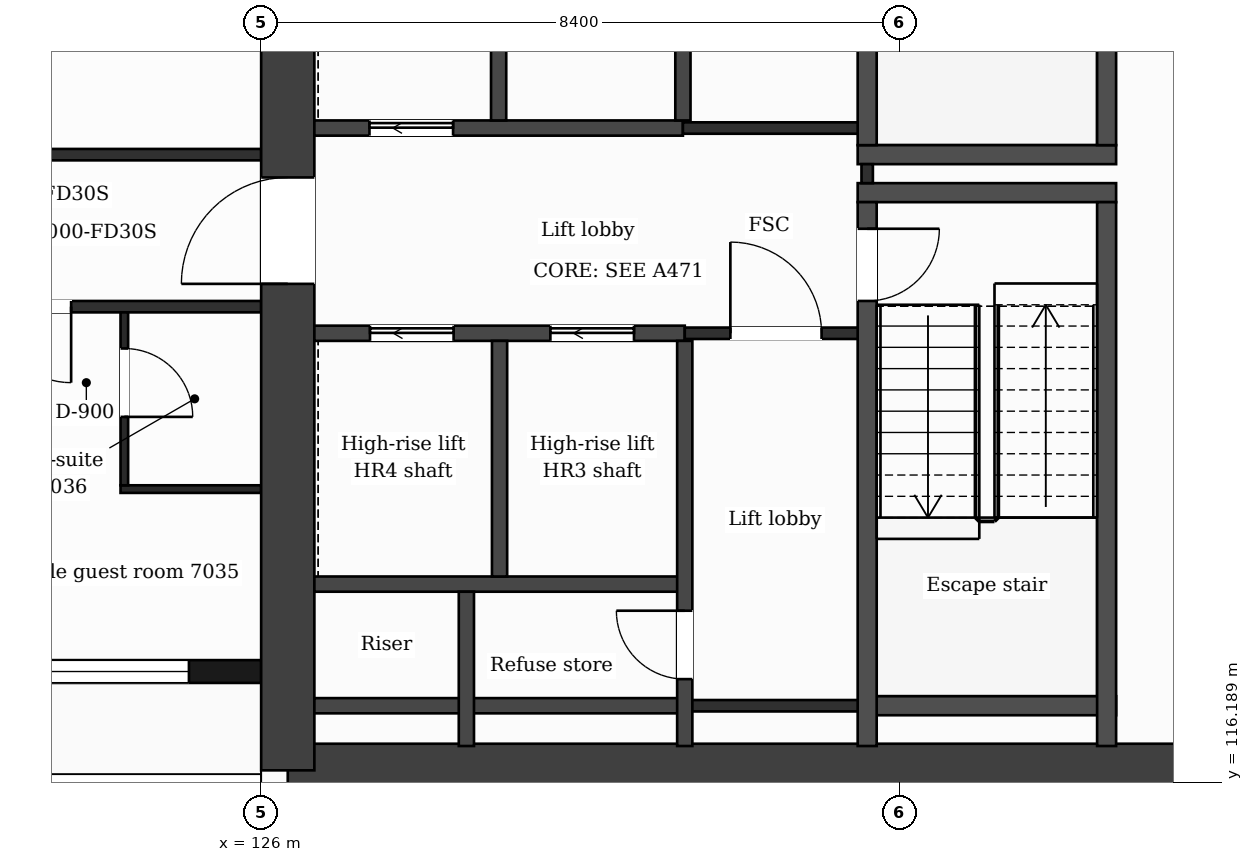
"""IFC4 building model, lengths in metres.
Left out: names, types, materials, properties, quantities, classifications, styles, units other than length and angle.
Written with IfcOpenShell. Run it as: python <this file> out.ifc"""

import sys

from ifc_helpers import new_model, si_unit, direction, frame, frame_2d, origin, place, context, subcontext, project, spatial, rectangle, extrude, element, fill, save


model = new_model("IFC4")
c1 = context("Model", 3, precision=1e-05, world=origin(), true_north=direction((0.0, 1.0)))
c2 = subcontext(c1, "Body", "Model", "MODEL_VIEW")
j1 = project(units=[si_unit("LENGTHUNIT", "METRE"), si_unit("PLANEANGLEUNIT", "RADIAN")], contexts=[c1])
p1 = place(None, origin())
s1 = spatial("IfcSite", under=j1, at=p1, CompositionType="ELEMENT")
p2 = place(p1, origin())
s2 = spatial("IfcBuilding", under=s1, at=p2, CompositionType="ELEMENT")
p3 = place(p2, frame((0.0, 0.0, 288.6)))
s3 = spatial("IfcBuildingStorey", under=s2, at=p3, CompositionType="ELEMENT", Elevation=288.6)
p4 = place(p3, frame((137.863, 132.05, 0.0), z_axis=(0.0, 0.0, 1.0), x_axis=(0.133401241494, -0.991062111458, 0.0)))
e1 = element("IfcWall", 1, at=p4, inside=s3, PredefinedType="SHEAR", context=c2, shape_type="SweptSolid", body=[
    extrude(rectangle(XDim=15.842, YDim=0.7, at=frame_2d((7.921, 0.0))), origin(), (0.0, 0.0, 1.0), 3.7),
])
p5 = place(p3, frame((139.977, 116.35, 0.0), z_axis=(0.0, 0.0, 1.0), x_axis=(-1.0, 0.0, 0.0)))
e2 = element("IfcWall", 2, at=p5, inside=s3, PredefinedType="SHEAR", context=c2, shape_type="SweptSolid", body=[
    extrude(rectangle(XDim=13.626, YDim=0.7, at=frame_2d((6.813, 0.0))), origin(), (0.0, 0.0, 1.0), 3.7),
])
p6 = place(p3, frame((126.35, 116.35, 0.0), z_axis=(0.0, 0.0, 1.0), x_axis=(0.0, 1.0, 0.0)))
e3 = element("IfcWall", 3, at=p6, inside=s3, PredefinedType="SHEAR", context=c2, shape_type="SweptSolid", body=[
    extrude(rectangle(XDim=15.7, YDim=0.7, at=frame_2d((7.85, 0.0))), origin(), (0.0, 0.0, 1.0), 3.7),
])
p7 = place(p6, frame((6.4, 0.0, 0.0)))
e4 = element("IfcOpeningElement", 4, at=p7, cuts=e3, PredefinedType="OPENING", context=c2, shape_type="SweptSolid", body=[
    extrude(rectangle(XDim=1.4, YDim=2.1, at=frame_2d((0.7, 1.05))), frame((0.0, 0.36, 0.0), z_axis=(0.0, -1.0, 0.0), x_axis=(1.0, 0.0, 0.0)), (0.0, 0.0, 1.0), 0.72),
])
p8 = place(p3, frame((100.8, 117.65, 0.0), z_axis=(0.0, 0.0, 1.0), x_axis=(1.0, 0.0, 0.0)))
e5 = element("IfcWall", 5, at=p8, inside=s3, PredefinedType="SOLIDWALL", context=c2, shape_type="SweptSolid", body=[
    extrude(rectangle(XDim=25.2, YDim=0.3, at=frame_2d((12.6, 0.0))), origin(), (0.0, 0.0, 1.0), 3.38),
])
p9 = place(p8, frame((1.55, 0.0, 0.9)))
e6 = element("IfcOpeningElement", 6, at=p9, cuts=e5, PredefinedType="OPENING", context=c2, shape_type="SweptSolid", body=[
    extrude(rectangle(XDim=1.2, YDim=2.1, at=frame_2d((0.6, 1.05))), frame((0.0, 0.16, 0.0), z_axis=(0.0, -1.0, 0.0), x_axis=(1.0, 0.0, 0.0)), (0.0, 0.0, 1.0), 0.32),
])
p10 = place(p8, frame((5.1, 0.0, 0.9)))
e7 = element("IfcOpeningElement", 7, at=p10, cuts=e5, PredefinedType="OPENING", context=c2, shape_type="SweptSolid", body=[
    extrude(rectangle(XDim=2.4, YDim=2.1, at=frame_2d((1.2, 1.05))), frame((0.0, 0.16, 0.0), z_axis=(0.0, -1.0, 0.0), x_axis=(1.0, 0.0, 0.0)), (0.0, 0.0, 1.0), 0.32),
])
p11 = place(p8, frame((9.9, 0.0, 0.0)))
e8 = element("IfcOpeningElement", 8, at=p11, cuts=e5, PredefinedType="OPENING", context=c2, shape_type="SweptSolid", body=[
    extrude(rectangle(XDim=1.2, YDim=2.4, at=frame_2d((0.6, 1.2))), frame((0.0, 0.16, 0.0), z_axis=(0.0, -1.0, 0.0), x_axis=(1.0, 0.0, 0.0)), (0.0, 0.0, 1.0), 0.32),
])
p12 = place(p8, frame((13.5, 0.0, 0.9)))
e9 = element("IfcOpeningElement", 9, at=p12, cuts=e5, PredefinedType="OPENING", context=c2, shape_type="SweptSolid", body=[
    extrude(rectangle(XDim=2.4, YDim=2.1, at=frame_2d((1.2, 1.05))), frame((0.0, 0.16, 0.0), z_axis=(0.0, -1.0, 0.0), x_axis=(1.0, 0.0, 0.0)), (0.0, 0.0, 1.0), 0.32),
])
p13 = place(p8, frame((17.7, 0.0, 0.9)))
e10 = element("IfcOpeningElement", 10, at=p13, cuts=e5, PredefinedType="OPENING", context=c2, shape_type="SweptSolid", body=[
    extrude(rectangle(XDim=2.4, YDim=2.1, at=frame_2d((1.2, 1.05))), frame((0.0, 0.16, 0.0), z_axis=(0.0, -1.0, 0.0), x_axis=(1.0, 0.0, 0.0)), (0.0, 0.0, 1.0), 0.32),
])
p14 = place(p8, frame((21.85, 0.0, 0.9)))
e11 = element("IfcOpeningElement", 11, at=p14, cuts=e5, PredefinedType="OPENING", context=c2, shape_type="SweptSolid", body=[
    extrude(rectangle(XDim=2.4, YDim=2.1, at=frame_2d((1.2, 1.05))), frame((0.0, 0.16, 0.0), z_axis=(0.0, -1.0, 0.0), x_axis=(1.0, 0.0, 0.0)), (0.0, 0.0, 1.0), 0.32),
])
p15 = place(p3, frame((126.7, 117.2, 0.0), z_axis=(0.0, 0.0, 1.0), x_axis=(1.0, 0.0, 0.0)))
e12 = element("IfcWall", 12, at=p15, inside=s3, PredefinedType="PARTITIONING", context=c2, shape_type="SweptSolid", body=[
    extrude(rectangle(XDim=4.873, YDim=0.2, at=frame_2d((2.437, 0.0))), origin(), (0.0, 0.0, 1.0), 3.38),
])
p16 = place(p3, frame((131.573, 117.2, 0.0), z_axis=(0.0, 0.0, 1.0), x_axis=(1.0, 0.0, 0.0)))
e13 = element("IfcWall", 13, at=p16, inside=s3, PredefinedType="PARTITIONING", context=c2, shape_type="SweptSolid", body=[
    extrude(rectangle(XDim=2.4, YDim=0.15, at=frame_2d((1.2, 0.0))), origin(), (0.0, 0.0, 1.0), 3.38),
])
p17 = place(p3, frame((133.973, 117.2, 0.0), z_axis=(0.0, 0.0, 1.0), x_axis=(1.0, 0.0, 0.0)))
e14 = element("IfcWall", 14, at=p17, inside=s3, PredefinedType="PARTITIONING", context=c2, shape_type="SweptSolid", body=[
    extrude(rectangle(XDim=3.275, YDim=0.25, at=frame_2d((1.638, 0.0))), origin(), (0.0, 0.0, 1.0), 3.38),
])
p18 = place(p3, frame((126.7, 118.8, 0.0), z_axis=(0.0, 0.0, 1.0), x_axis=(1.0, 0.0, 0.0)))
e15 = element("IfcWall", 15, at=p18, inside=s3, PredefinedType="PARTITIONING", context=c2, shape_type="SweptSolid", body=[
    extrude(rectangle(XDim=4.873, YDim=0.2, at=frame_2d((2.437, 0.0))), origin(), (0.0, 0.0, 1.0), 3.38),
])
p19 = place(p3, frame((124.15, 120.05, 0.0), z_axis=(0.0, 0.0, 1.0), x_axis=(1.0, 0.0, 0.0)))
e16 = element("IfcWall", 16, at=p19, inside=s3, PredefinedType="PARTITIONING", context=c2, shape_type="SweptSolid", body=[
    extrude(rectangle(XDim=1.85, YDim=0.1, at=frame_2d((0.925, 0.0))), origin(), (0.0, 0.0, 1.0), 3.38),
])
p20 = place(p3, frame((126.7, 122.1, 0.0), z_axis=(0.0, 0.0, 1.0), x_axis=(1.0, 0.0, 0.0)))
e17 = element("IfcWall", 17, at=p20, inside=s3, PredefinedType="PARTITIONING", context=c2, shape_type="SweptSolid", body=[
    extrude(rectangle(XDim=4.873, YDim=0.2, at=frame_2d((2.437, 0.0))), origin(), (0.0, 0.0, 1.0), 3.38),
])
p21 = place(p20, frame((3.105, 0.0, 0.0)))
e18 = element("IfcOpeningElement", 18, at=p21, cuts=e17, PredefinedType="OPENING", context=c2, shape_type="SweptSolid", body=[
    extrude(rectangle(XDim=1.1, YDim=2.1, at=frame_2d((0.55, 1.05))), frame((0.0, 0.11, 0.0), z_axis=(0.0, -1.0, 0.0), x_axis=(1.0, 0.0, 0.0)), (0.0, 0.0, 1.0), 0.22),
])
p22 = place(p20, frame((0.732, 0.0, 0.0)))
e19 = element("IfcOpeningElement", 19, at=p22, cuts=e17, PredefinedType="OPENING", context=c2, shape_type="SweptSolid", body=[
    extrude(rectangle(XDim=1.1, YDim=2.1, at=frame_2d((0.55, 1.05))), frame((0.0, 0.11, 0.0), z_axis=(0.0, -1.0, 0.0), x_axis=(1.0, 0.0, 0.0)), (0.0, 0.0, 1.0), 0.22),
])
p23 = place(p3, frame((131.573, 122.1, 0.0), z_axis=(0.0, 0.0, 1.0), x_axis=(1.0, 0.0, 0.0)))
e20 = element("IfcWall", 20, at=p23, inside=s3, PredefinedType="PARTITIONING", context=c2, shape_type="SweptSolid", body=[
    extrude(rectangle(XDim=2.4, YDim=0.15, at=frame_2d((1.2, 0.0))), origin(), (0.0, 0.0, 1.0), 3.38),
])
p24 = place(p23, frame((0.6, 0.0, 0.0)))
e21 = element("IfcOpeningElement", 21, at=p24, cuts=e20, PredefinedType="OPENING", context=c2, shape_type="SweptSolid", body=[
    extrude(rectangle(XDim=1.2, YDim=2.1, at=frame_2d((0.6, 1.05))), frame((0.0, 0.085, 0.0), z_axis=(0.0, -1.0, 0.0), x_axis=(1.0, 0.0, 0.0)), (0.0, 0.0, 1.0), 0.17),
])
p25 = place(p3, frame((100.8, 122.45, 0.0), z_axis=(0.0, 0.0, 1.0), x_axis=(1.0, 0.0, 0.0)))
e22 = element("IfcWall", 22, at=p25, inside=s3, PredefinedType="PARTITIONING", context=c2, shape_type="SweptSolid", body=[
    extrude(rectangle(XDim=25.2, YDim=0.15, at=frame_2d((12.6, 0.0))), origin(), (0.0, 0.0, 1.0), 3.38),
])
p26 = place(p25, frame((0.55, 0.0, 0.0)))
e23 = element("IfcOpeningElement", 23, at=p26, cuts=e22, PredefinedType="OPENING", context=c2, shape_type="SweptSolid", body=[
    extrude(rectangle(XDim=1.0, YDim=2.1, at=frame_2d((0.5, 1.05))), frame((0.0, 0.085, 0.0), z_axis=(0.0, -1.0, 0.0), x_axis=(1.0, 0.0, 0.0)), (0.0, 0.0, 1.0), 0.17),
])
p27 = place(p25, frame((9.375, 0.0, 0.0)))
e24 = element("IfcOpeningElement", 24, at=p27, cuts=e22, PredefinedType="OPENING", context=c2, shape_type="SweptSolid", body=[
    extrude(rectangle(XDim=1.0, YDim=2.1, at=frame_2d((0.5, 1.05))), frame((0.0, 0.085, 0.0), z_axis=(0.0, -1.0, 0.0), x_axis=(1.0, 0.0, 0.0)), (0.0, 0.0, 1.0), 0.17),
])
p28 = place(p25, frame((13.23, 0.0, 0.0)))
e25 = element("IfcOpeningElement", 25, at=p28, cuts=e22, PredefinedType="OPENING", context=c2, shape_type="SweptSolid", body=[
    extrude(rectangle(XDim=1.0, YDim=2.1, at=frame_2d((0.5, 1.05))), frame((0.0, 0.085, 0.0), z_axis=(0.0, -1.0, 0.0), x_axis=(1.0, 0.0, 0.0)), (0.0, 0.0, 1.0), 0.17),
])
p29 = place(p25, frame((19.513, 0.0, 0.0)))
e26 = element("IfcOpeningElement", 26, at=p29, cuts=e22, PredefinedType="OPENING", context=c2, shape_type="SweptSolid", body=[
    extrude(rectangle(XDim=0.95, YDim=2.1, at=frame_2d((0.475, 1.05))), frame((0.0, 0.085, 0.0), z_axis=(0.0, -1.0, 0.0), x_axis=(1.0, 0.0, 0.0)), (0.0, 0.0, 1.0), 0.17),
])
p30 = place(p25, frame((21.7, 0.0, 0.0)))
e27 = element("IfcOpeningElement", 27, at=p30, cuts=e22, PredefinedType="OPENING", context=c2, shape_type="SweptSolid", body=[
    extrude(rectangle(XDim=1.0, YDim=2.1, at=frame_2d((0.5, 1.05))), frame((0.0, 0.085, 0.0), z_axis=(0.0, -1.0, 0.0), x_axis=(1.0, 0.0, 0.0)), (0.0, 0.0, 1.0), 0.17),
])
for number, where, z_axis, x_axis in (
    (28, (133.848, 123.95, 0.0), (0.0, 0.0, 1.0), (1.0, 0.0, 0.0)),
    (29, (133.848, 124.45, 0.0), (0.0, 0.0, 1.0), (1.0, 0.0, 0.0)),
):
    element("IfcWall", number, at=place(p3, frame(where, z_axis=z_axis, x_axis=x_axis)), inside=s3, PredefinedType="PARTITIONING", context=c2, shape_type="SweptSolid", body=[
        extrude(rectangle(XDim=3.4, YDim=0.25, at=frame_2d((1.7, 0.0))), origin(), (0.0, 0.0, 1.0), 3.38),
    ])
p31 = place(p3, frame((100.8, 124.45, 0.0), z_axis=(0.0, 0.0, 1.0), x_axis=(1.0, 0.0, 0.0)))
e30 = element("IfcWall", 30, at=p31, inside=s3, PredefinedType="PARTITIONING", context=c2, shape_type="SweptSolid", body=[
    extrude(rectangle(XDim=25.2, YDim=0.15, at=frame_2d((12.6, 0.0))), origin(), (0.0, 0.0, 1.0), 3.38),
])
p32 = place(p31, frame((21.075, 0.0, 0.0)))
e31 = element("IfcOpeningElement", 31, at=p32, cuts=e30, PredefinedType="OPENING", context=c2, shape_type="SweptSolid", body=[
    extrude(rectangle(XDim=1.0, YDim=2.1, at=frame_2d((0.5, 1.05))), frame((0.0, 0.085, 0.0), z_axis=(0.0, -1.0, 0.0), x_axis=(1.0, 0.0, 0.0)), (0.0, 0.0, 1.0), 0.17),
])
p33 = place(p31, frame((5.375, 0.0, 0.0)))
e32 = element("IfcOpeningElement", 32, at=p33, cuts=e30, PredefinedType="OPENING", context=c2, shape_type="SweptSolid", body=[
    extrude(rectangle(XDim=1.0, YDim=2.1, at=frame_2d((0.5, 1.05))), frame((0.0, 0.085, 0.0), z_axis=(0.0, -1.0, 0.0), x_axis=(1.0, 0.0, 0.0)), (0.0, 0.0, 1.0), 0.17),
])
p34 = place(p31, frame((12.1, 0.0, 0.0)))
e33 = element("IfcOpeningElement", 33, at=p34, cuts=e30, PredefinedType="OPENING", context=c2, shape_type="SweptSolid", body=[
    extrude(rectangle(XDim=1.0, YDim=2.1, at=frame_2d((0.5, 1.05))), frame((0.0, 0.085, 0.0), z_axis=(0.0, -1.0, 0.0), x_axis=(1.0, 0.0, 0.0)), (0.0, 0.0, 1.0), 0.17),
])
p35 = place(p31, frame((17.93, 0.0, 0.0)))
e34 = element("IfcOpeningElement", 34, at=p35, cuts=e30, PredefinedType="OPENING", context=c2, shape_type="SweptSolid", body=[
    extrude(rectangle(XDim=1.0, YDim=2.1, at=frame_2d((0.5, 1.05))), frame((0.0, 0.085, 0.0), z_axis=(0.0, -1.0, 0.0), x_axis=(1.0, 0.0, 0.0)), (0.0, 0.0, 1.0), 0.17),
])
p36 = place(p3, frame((126.7, 124.8, 0.0), z_axis=(0.0, 0.0, 1.0), x_axis=(1.0, 0.0, 0.0)))
e35 = element("IfcWall", 35, at=p36, inside=s3, PredefinedType="PARTITIONING", context=c2, shape_type="SweptSolid", body=[
    extrude(rectangle(XDim=4.849, YDim=0.2, at=frame_2d((2.424, 0.0))), origin(), (0.0, 0.0, 1.0), 3.38),
])
p37 = place(p36, frame((0.725, 0.0, 0.0)))
e36 = element("IfcOpeningElement", 36, at=p37, cuts=e35, PredefinedType="OPENING", context=c2, shape_type="SweptSolid", body=[
    extrude(rectangle(XDim=1.1, YDim=2.1, at=frame_2d((0.55, 1.05))), frame((0.0, 0.11, 0.0), z_axis=(0.0, -1.0, 0.0), x_axis=(1.0, 0.0, 0.0)), (0.0, 0.0, 1.0), 0.22),
])
p38 = place(p3, frame((131.549, 124.8, 0.0), z_axis=(0.0, 0.0, 1.0), x_axis=(1.0, 0.0, 0.0)))
e37 = element("IfcWall", 37, at=p38, inside=s3, PredefinedType="PARTITIONING", context=c2, shape_type="SweptSolid", body=[
    extrude(rectangle(XDim=2.549, YDim=0.15, at=frame_2d((1.275, 0.0))), origin(), (0.0, 0.0, 1.0), 3.38),
])
p39 = place(p3, frame((124.2, 120.1, 0.0), z_axis=(0.0, 0.0, 1.0), x_axis=(0.0, 1.0, 0.0)))
e38 = element("IfcWall", 38, at=p39, inside=s3, PredefinedType="PARTITIONING", context=c2, shape_type="SweptSolid", body=[
    extrude(rectangle(XDim=2.275, YDim=0.1, at=frame_2d((1.137, 0.0))), origin(), (0.0, 0.0, 1.0), 3.38),
])
p40 = place(p39, frame((0.9, 0.0, 0.0)))
e39 = element("IfcOpeningElement", 39, at=p40, cuts=e38, PredefinedType="OPENING", context=c2, shape_type="SweptSolid", body=[
    extrude(rectangle(XDim=0.9, YDim=2.1, at=frame_2d((0.45, 1.05))), frame((0.0, 0.06, 0.0), z_axis=(0.0, -1.0, 0.0), x_axis=(1.0, 0.0, 0.0)), (0.0, 0.0, 1.0), 0.12),
])
p41 = place(p3, frame((128.7, 116.67, 0.0), z_axis=(0.0, 0.0, 1.0), x_axis=(0.0, 1.0, 0.0)))
e40 = element("IfcWall", 40, at=p41, inside=s3, PredefinedType="PARTITIONING", context=c2, shape_type="SweptSolid", body=[
    extrude(rectangle(XDim=2.03, YDim=0.2, at=frame_2d((1.015, 0.0))), origin(), (0.0, 0.0, 1.0), 3.38),
])
for number, where, z_axis, x_axis in (
    (41, (129.124, 124.9, 0.0), (0.0, 0.0, 1.0), (0.0, 1.0, 0.0)),
    (42, (129.136, 118.9, 0.0), (0.0, 0.0, 1.0), (0.0, 1.0, 0.0)),
    (43, (131.549, 124.9, 0.0), (0.0, 0.0, 1.0), (0.0, 1.0, 0.0)),
):
    element("IfcWall", number, at=place(p3, frame(where, z_axis=z_axis, x_axis=x_axis)), inside=s3, PredefinedType="PARTITIONING", context=c2, shape_type="SweptSolid", body=[
        extrude(rectangle(XDim=3.1, YDim=0.2, at=frame_2d((1.55, 0.0))), origin(), (0.0, 0.0, 1.0), 3.38),
    ])
p42 = place(p3, frame((131.573, 116.67, 0.0), z_axis=(0.0, 0.0, 1.0), x_axis=(0.0, 1.0, 0.0)))
e44 = element("IfcWall", 44, at=p42, inside=s3, PredefinedType="PARTITIONING", context=c2, shape_type="SweptSolid", body=[
    extrude(rectangle(XDim=5.33, YDim=0.2, at=frame_2d((2.665, 0.0))), origin(), (0.0, 0.0, 1.0), 3.38),
])
p43 = place(p42, frame((0.88, 0.0, 0.0)))
e45 = element("IfcOpeningElement", 45, at=p43, cuts=e44, PredefinedType="OPENING", context=c2, shape_type="SweptSolid", body=[
    extrude(rectangle(XDim=0.9, YDim=2.1, at=frame_2d((0.45, 1.05))), frame((0.0, 0.11, 0.0), z_axis=(0.0, -1.0, 0.0), x_axis=(1.0, 0.0, 0.0)), (0.0, 0.0, 1.0), 0.22),
])
p44 = place(p3, frame((133.973, 124.075, 0.0), z_axis=(0.0, 0.0, 1.0), x_axis=(0.0, 1.0, 0.0)))
e46 = element("IfcWall", 46, at=p44, inside=s3, PredefinedType="PARTITIONING", context=c2, shape_type="SweptSolid", body=[
    extrude(rectangle(XDim=0.25, YDim=0.15, at=frame_2d((0.125, 0.0))), origin(), (0.0, 0.0, 1.0), 3.38),
])
p45 = place(p3, frame((133.973, 116.67, 0.0), z_axis=(0.0, 0.0, 1.0), x_axis=(0.0, 1.0, 0.0)))
e47 = element("IfcWall", 47, at=p45, inside=s3, PredefinedType="PARTITIONING", context=c2, shape_type="SweptSolid", body=[
    extrude(rectangle(XDim=7.155, YDim=0.25, at=frame_2d((3.578, 0.0))), origin(), (0.0, 0.0, 1.0), 3.38),
])
p46 = place(p45, frame((5.855, 0.0, 0.0)))
e48 = element("IfcOpeningElement", 48, at=p46, cuts=e47, PredefinedType="OPENING", context=c2, shape_type="SweptSolid", body=[
    extrude(rectangle(XDim=0.95, YDim=2.1, at=frame_2d((0.475, 1.05))), frame((0.0, 0.135, 0.0), z_axis=(0.0, -1.0, 0.0), x_axis=(1.0, 0.0, 0.0)), (0.0, 0.0, 1.0), 0.27),
])
p47 = place(p3, frame((133.973, 124.575, 0.0), z_axis=(0.0, 0.0, 1.0), x_axis=(0.0, 1.0, 0.0)))
e49 = element("IfcWall", 49, at=p47, inside=s3, PredefinedType="PARTITIONING", context=c2, shape_type="SweptSolid", body=[
    extrude(rectangle(XDim=7.155, YDim=0.25, at=frame_2d((3.578, 0.0))), origin(), (0.0, 0.0, 1.0), 3.38),
])
p48 = place(p47, frame((5.325, 0.0, 0.0)))
e50 = element("IfcOpeningElement", 50, at=p48, cuts=e49, PredefinedType="OPENING", context=c2, shape_type="SweptSolid", body=[
    extrude(rectangle(XDim=1.0, YDim=2.1, at=frame_2d((0.5, 1.05))), frame((0.0, 0.135, 0.0), z_axis=(0.0, -1.0, 0.0), x_axis=(1.0, 0.0, 0.0)), (0.0, 0.0, 1.0), 0.27),
])
for number, where, z_axis, x_axis in (
    (51, (137.123, 116.67, 0.0), (0.0, 0.0, 1.0), (0.0, 1.0, 0.0)),
    (52, (137.123, 124.575, 0.0), (0.0, 0.0, 1.0), (0.0, 1.0, 0.0)),
):
    element("IfcWall", number, at=place(p3, frame(where, z_axis=z_axis, x_axis=x_axis)), inside=s3, PredefinedType="PARTITIONING", context=c2, shape_type="SweptSolid", body=[
        extrude(rectangle(XDim=7.155, YDim=0.25, at=frame_2d((3.578, 0.0))), origin(), (0.0, 0.0, 1.0), 3.38),
    ])
p49 = place(p14, origin())
e53 = element("IfcWindow", 53, at=p49, inside=s3, PartitioningType="SINGLE_PANEL", PredefinedType="WINDOW", context=c2, shape_type="SweptSolid", body=[
    extrude(rectangle(XDim=2.4, YDim=2.1, at=frame_2d((1.2, 1.05))), frame((0.0, 0.03, 0.0), z_axis=(0.0, -1.0, 0.0), x_axis=(1.0, 0.0, 0.0)), (0.0, 0.0, 1.0), 0.06),
])
fill(e11, e53)
p50 = place(p24, origin())
e54 = element("IfcDoor", 54, at=p50, inside=s3, OperationType="SINGLE_SWING_LEFT", PredefinedType="DOOR", context=c2, shape_type="SweptSolid", body=[
    extrude(rectangle(XDim=1.2, YDim=2.1, at=frame_2d((0.6, 1.05))), frame((0.0, 0.025, 0.0), z_axis=(0.0, -1.0, 0.0), x_axis=(1.0, 0.0, 0.0)), (0.0, 0.0, 1.0), 0.05),
])
fill(e21, e54)
p51 = place(p21, origin())
e55 = element("IfcDoor", 55, at=p51, inside=s3, OperationType="SLIDING_TO_LEFT", PredefinedType="DOOR", context=c2, shape_type="SweptSolid", body=[
    extrude(rectangle(XDim=1.1, YDim=2.1, at=frame_2d((0.55, 1.05))), frame((0.0, 0.025, 0.0), z_axis=(0.0, -1.0, 0.0), x_axis=(1.0, 0.0, 0.0)), (0.0, 0.0, 1.0), 0.05),
])
fill(e18, e55)
p52 = place(p22, origin())
e56 = element("IfcDoor", 56, at=p52, inside=s3, OperationType="SLIDING_TO_LEFT", PredefinedType="DOOR", context=c2, shape_type="SweptSolid", body=[
    extrude(rectangle(XDim=1.1, YDim=2.1, at=frame_2d((0.55, 1.05))), frame((0.0, 0.025, 0.0), z_axis=(0.0, -1.0, 0.0), x_axis=(1.0, 0.0, 0.0)), (0.0, 0.0, 1.0), 0.05),
])
fill(e19, e56)
p53 = place(p37, origin())
e57 = element("IfcDoor", 57, at=p53, inside=s3, OperationType="SLIDING_TO_LEFT", PredefinedType="DOOR", context=c2, shape_type="SweptSolid", body=[
    extrude(rectangle(XDim=1.1, YDim=2.1, at=frame_2d((0.55, 1.05))), frame((0.0, 0.025, 0.0), z_axis=(0.0, -1.0, 0.0), x_axis=(1.0, 0.0, 0.0)), (0.0, 0.0, 1.0), 0.05),
])
fill(e36, e57)
p54 = place(p46, origin())
e58 = element("IfcDoor", 58, at=p54, inside=s3, OperationType="SINGLE_SWING_RIGHT", PredefinedType="DOOR", context=c2, shape_type="SweptSolid", body=[
    extrude(rectangle(XDim=0.95, YDim=2.1, at=frame_2d((0.475, 1.05))), frame((0.0, 0.025, 0.0), z_axis=(0.0, -1.0, 0.0), x_axis=(1.0, 0.0, 0.0)), (0.0, 0.0, 1.0), 0.05),
])
fill(e48, e58)
p55 = place(p43, origin())
e59 = element("IfcDoor", 59, at=p55, inside=s3, OperationType="SINGLE_SWING_RIGHT", PredefinedType="DOOR", context=c2, shape_type="SweptSolid", body=[
    extrude(rectangle(XDim=0.9, YDim=2.1, at=frame_2d((0.45, 1.05))), frame((0.0, 0.025, 0.0), z_axis=(0.0, -1.0, 0.0), x_axis=(1.0, 0.0, 0.0)), (0.0, 0.0, 1.0), 0.05),
])
fill(e45, e59)
p56 = place(p30, origin())
e60 = element("IfcDoor", 60, at=p56, inside=s3, OperationType="SINGLE_SWING_RIGHT", PredefinedType="DOOR", context=c2, shape_type="SweptSolid", body=[
    extrude(rectangle(XDim=1.0, YDim=2.1, at=frame_2d((0.5, 1.05))), frame((0.0, 0.025, 0.0), z_axis=(0.0, -1.0, 0.0), x_axis=(1.0, 0.0, 0.0)), (0.0, 0.0, 1.0), 0.05),
])
fill(e27, e60)
p57 = place(p40, origin())
e61 = element("IfcDoor", 61, at=p57, inside=s3, OperationType="SINGLE_SWING_LEFT", PredefinedType="DOOR", context=c2, shape_type="SweptSolid", body=[
    extrude(rectangle(XDim=0.9, YDim=2.1, at=frame_2d((0.45, 1.05))), frame((0.0, 0.025, 0.0), z_axis=(0.0, -1.0, 0.0), x_axis=(1.0, 0.0, 0.0)), (0.0, 0.0, 1.0), 0.05),
])
fill(e39, e61)
p58 = place(p7, origin())
e62 = element("IfcDoor", 62, at=p58, inside=s3, OperationType="SINGLE_SWING_LEFT", PredefinedType="DOOR", context=c2, shape_type="SweptSolid", body=[
    extrude(rectangle(XDim=1.4, YDim=2.1, at=frame_2d((0.7, 1.05))), frame((0.0, 0.025, 0.0), z_axis=(0.0, -1.0, 0.0), x_axis=(1.0, 0.0, 0.0)), (0.0, 0.0, 1.0), 0.05),
])
fill(e4, e62)
save(model, sys.argv[1])
